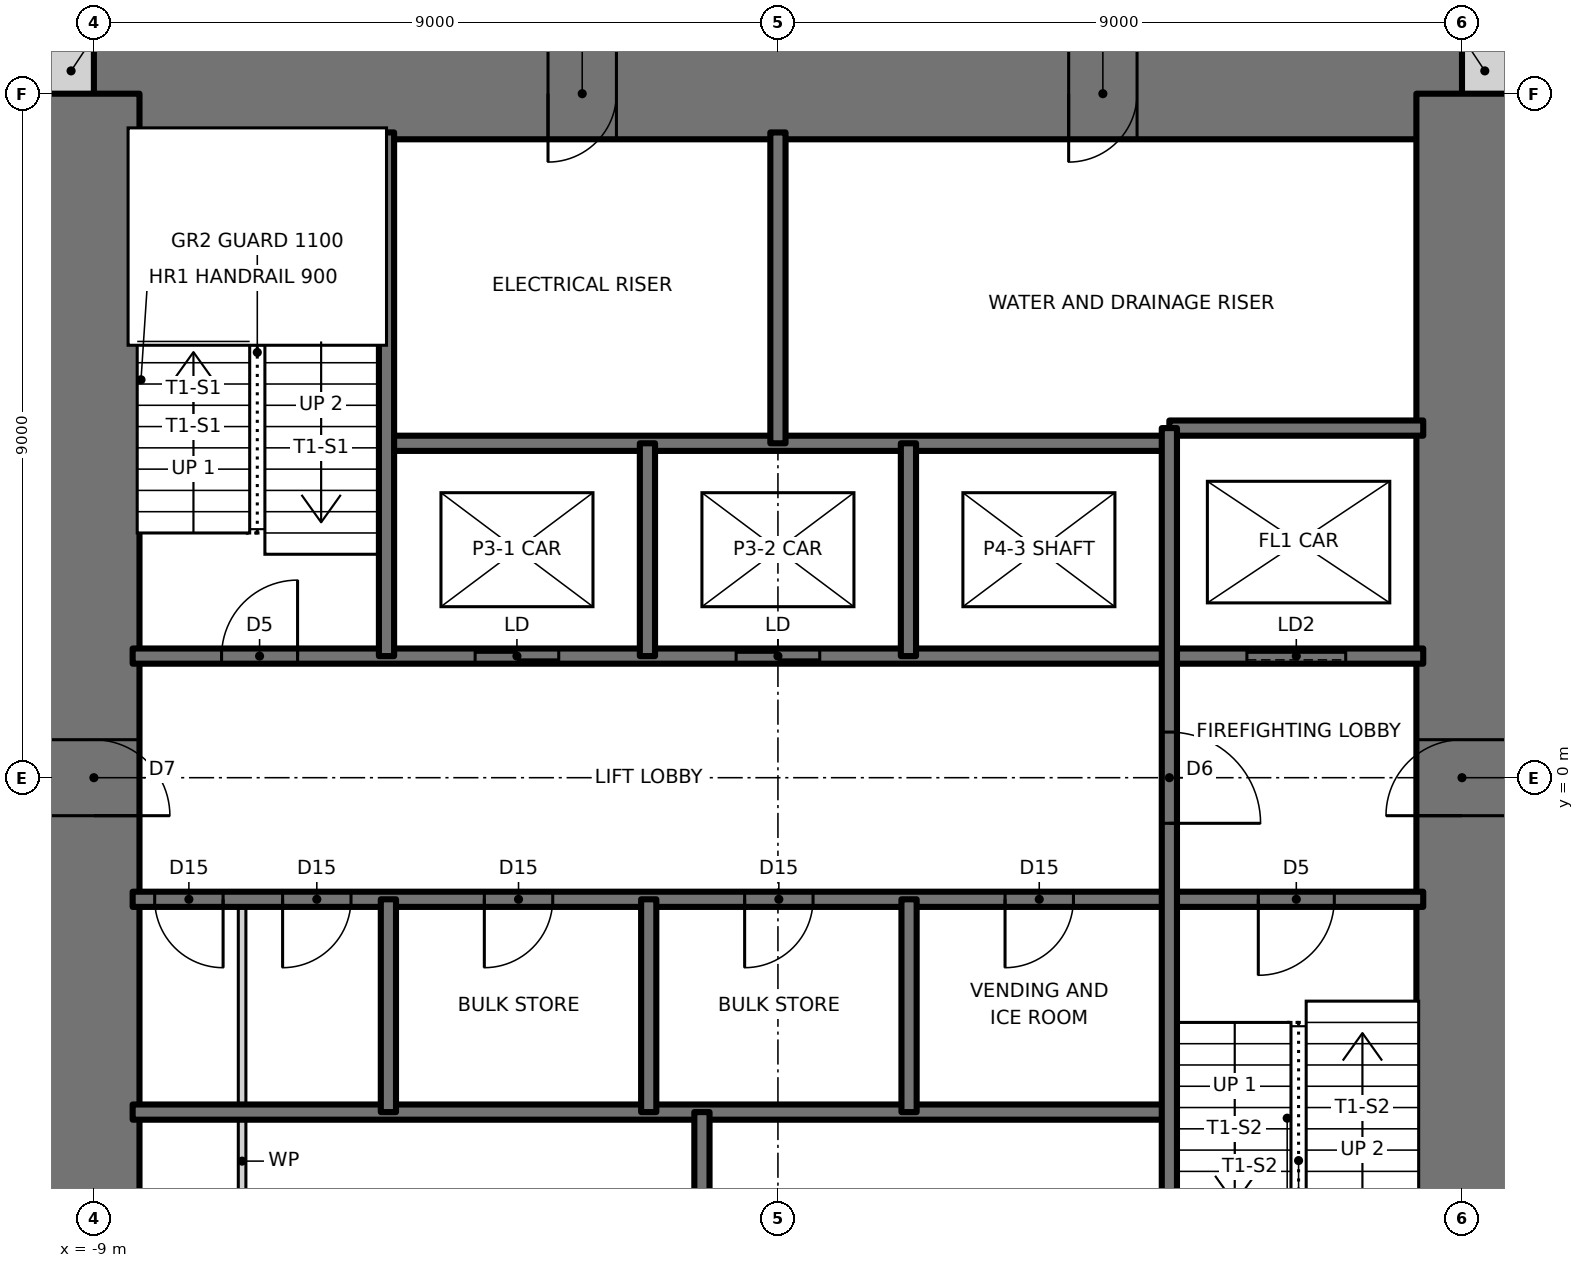
"""IFC4 building model, lengths in metres.
Left out: names, types, materials, properties, quantities, classifications, styles, units other than length and angle.
Written with IfcOpenShell. Run it as: python <this file> out.ifc"""

import sys

from ifc_helpers import new_model, si_unit, direction, frame, frame_2d, origin, place, context, subcontext, project, spatial, rectangle, extrude, element, fill, save


model = new_model("IFC4")
c1 = context("Model", 3, precision=1e-05, world=origin(), true_north=direction((0.0, 1.0)))
c2 = subcontext(c1, "Body", "Model", "MODEL_VIEW")
j1 = project(units=[si_unit("LENGTHUNIT", "METRE"), si_unit("PLANEANGLEUNIT", "RADIAN")], contexts=[c1])
p1 = place(None, origin())
s1 = spatial("IfcSite", under=j1, at=p1, CompositionType="ELEMENT")
p2 = place(p1, origin())
s2 = spatial("IfcBuilding", under=s1, at=p2, CompositionType="ELEMENT")
p3 = place(p2, frame((0.0, 0.0, 195.0)))
s3 = spatial("IfcBuildingStorey", under=s2, at=p3, CompositionType="ELEMENT", Elevation=195.0)
for number, where, z_axis, x_axis in (
    (1, (9.0, 9.3, 0.0), (0.0, 0.0, 1.0), (1.0, 0.0, 0.0)),
    (2, (-9.6, 9.3, 0.0), (0.0, 0.0, 1.0), (1.0, 0.0, 0.0)),
):
    element("IfcWall", number, at=place(p3, frame(where, z_axis=z_axis, x_axis=x_axis)), inside=s3, PredefinedType="SOLIDWALL", context=c2, shape_type="SweptSolid", body=[
        extrude(rectangle(XDim=0.6, YDim=0.6, at=frame_2d((0.3, 0.0))), origin(), (0.0, 0.0, 1.0), 3.5),
    ])
p4 = place(p3, frame((9.0, 9.0, 0.0), z_axis=(0.0, 0.0, 1.0), x_axis=(-1.0, 0.0, 0.0)))
e3 = element("IfcWall", 3, at=p4, inside=s3, PredefinedType="SHEAR", context=c2, shape_type="SweptSolid", body=[
    extrude(rectangle(XDim=18.0, YDim=1.2, at=frame_2d((9.0, 0.0))), origin(), (0.0, 0.0, 1.0), 3.5),
])
p5 = place(p4, frame((11.125, 0.0, 0.0)))
e4 = element("IfcOpeningElement", 4, at=p5, cuts=e3, PredefinedType="OPENING", context=c2, shape_type="SweptSolid", body=[
    extrude(rectangle(XDim=0.9, YDim=2.1, at=frame_2d((0.45, 1.05))), frame((0.0, 0.61, 0.0), z_axis=(0.0, -1.0, 0.0), x_axis=(1.0, 0.0, 0.0)), (0.0, 0.0, 1.0), 1.22),
])
p6 = place(p4, frame((4.275, 0.0, 0.0)))
e5 = element("IfcOpeningElement", 5, at=p6, cuts=e3, PredefinedType="OPENING", context=c2, shape_type="SweptSolid", body=[
    extrude(rectangle(XDim=0.9, YDim=2.1, at=frame_2d((0.45, 1.05))), frame((0.0, 0.61, 0.0), z_axis=(0.0, -1.0, 0.0), x_axis=(1.0, 0.0, 0.0)), (0.0, 0.0, 1.0), 1.22),
])
p7 = place(p3, frame((9.0, -9.0, 0.0), z_axis=(0.0, 0.0, 1.0), x_axis=(0.0, 1.0, 0.0)))
e6 = element("IfcWall", 6, at=p7, inside=s3, PredefinedType="SHEAR", context=c2, shape_type="SweptSolid", body=[
    extrude(rectangle(XDim=18.0, YDim=1.2, at=frame_2d((9.0, 0.0))), origin(), (0.0, 0.0, 1.0), 3.5),
])
p8 = place(p7, frame((8.5, 0.0, 0.0)))
e7 = element("IfcOpeningElement", 7, at=p8, cuts=e6, PredefinedType="OPENING", context=c2, shape_type="SweptSolid", body=[
    extrude(rectangle(XDim=1.0, YDim=2.1, at=frame_2d((0.5, 1.05))), frame((0.0, 0.61, 0.0), z_axis=(0.0, -1.0, 0.0), x_axis=(1.0, 0.0, 0.0)), (0.0, 0.0, 1.0), 1.22),
])
p9 = place(p3, frame((-9.0, 9.0, 0.0), z_axis=(0.0, 0.0, 1.0), x_axis=(0.0, -1.0, 0.0)))
e8 = element("IfcWall", 8, at=p9, inside=s3, PredefinedType="SHEAR", context=c2, shape_type="SweptSolid", body=[
    extrude(rectangle(XDim=18.0, YDim=1.2, at=frame_2d((9.0, 0.0))), origin(), (0.0, 0.0, 1.0), 3.5),
])
p10 = place(p9, frame((8.5, 0.0, 0.0)))
e9 = element("IfcOpeningElement", 9, at=p10, cuts=e8, PredefinedType="OPENING", context=c2, shape_type="SweptSolid", body=[
    extrude(rectangle(XDim=1.0, YDim=2.1, at=frame_2d((0.5, 1.05))), frame((0.0, 0.61, 0.0), z_axis=(0.0, -1.0, 0.0), x_axis=(1.0, 0.0, 0.0)), (0.0, 0.0, 1.0), 1.22),
])
p11 = place(p3, frame((-8.49, -4.4, 0.0), z_axis=(0.0, 0.0, 1.0), x_axis=(1.0, 0.0, 0.0)))
e10 = element("IfcWall", 10, at=p11, inside=s3, PredefinedType="SOLIDWALL", context=c2, shape_type="SweptSolid", body=[
    extrude(rectangle(XDim=13.64, YDim=0.2, at=frame_2d((6.82, 0.0))), origin(), (0.0, 0.0, 1.0), 3.5),
])
p12 = place(p3, frame((-8.49, -1.6, 0.0), z_axis=(0.0, 0.0, 1.0), x_axis=(1.0, 0.0, 0.0)))
e11 = element("IfcWall", 11, at=p12, inside=s3, PredefinedType="SOLIDWALL", context=c2, shape_type="SweptSolid", body=[
    extrude(rectangle(XDim=16.98, YDim=0.2, at=frame_2d((8.49, 0.0))), origin(), (0.0, 0.0, 1.0), 3.5),
])
p13 = place(p12, frame((14.81, 0.0, 0.0)))
e12 = element("IfcOpeningElement", 12, at=p13, cuts=e11, PredefinedType="OPENING", context=c2, shape_type="SweptSolid", body=[
    extrude(rectangle(XDim=1.0, YDim=2.1, at=frame_2d((0.5, 1.05))), frame((0.0, 0.11, 0.0), z_axis=(0.0, -1.0, 0.0), x_axis=(1.0, 0.0, 0.0)), (0.0, 0.0, 1.0), 0.22),
])
p14 = place(p12, frame((1.973, 0.0, 0.0)))
e13 = element("IfcOpeningElement", 13, at=p14, cuts=e11, PredefinedType="OPENING", context=c2, shape_type="SweptSolid", body=[
    extrude(rectangle(XDim=0.9, YDim=2.1, at=frame_2d((0.45, 1.05))), frame((0.0, 0.11, 0.0), z_axis=(0.0, -1.0, 0.0), x_axis=(1.0, 0.0, 0.0)), (0.0, 0.0, 1.0), 0.22),
])
p15 = place(p12, frame((0.29, 0.0, 0.0)))
e14 = element("IfcOpeningElement", 14, at=p15, cuts=e11, PredefinedType="OPENING", context=c2, shape_type="SweptSolid", body=[
    extrude(rectangle(XDim=0.9, YDim=2.1, at=frame_2d((0.45, 1.05))), frame((0.0, 0.11, 0.0), z_axis=(0.0, -1.0, 0.0), x_axis=(1.0, 0.0, 0.0)), (0.0, 0.0, 1.0), 0.22),
])
p16 = place(p12, frame((4.627, 0.0, 0.0)))
e15 = element("IfcOpeningElement", 15, at=p16, cuts=e11, PredefinedType="OPENING", context=c2, shape_type="SweptSolid", body=[
    extrude(rectangle(XDim=0.9, YDim=2.1, at=frame_2d((0.45, 1.05))), frame((0.0, 0.11, 0.0), z_axis=(0.0, -1.0, 0.0), x_axis=(1.0, 0.0, 0.0)), (0.0, 0.0, 1.0), 0.22),
])
p17 = place(p12, frame((8.052, 0.0, 0.0)))
e16 = element("IfcOpeningElement", 16, at=p17, cuts=e11, PredefinedType="OPENING", context=c2, shape_type="SweptSolid", body=[
    extrude(rectangle(XDim=0.9, YDim=2.1, at=frame_2d((0.45, 1.05))), frame((0.0, 0.11, 0.0), z_axis=(0.0, -1.0, 0.0), x_axis=(1.0, 0.0, 0.0)), (0.0, 0.0, 1.0), 0.22),
])
p18 = place(p12, frame((11.478, 0.0, 0.0)))
e17 = element("IfcOpeningElement", 17, at=p18, cuts=e11, PredefinedType="OPENING", context=c2, shape_type="SweptSolid", body=[
    extrude(rectangle(XDim=0.9, YDim=2.1, at=frame_2d((0.45, 1.05))), frame((0.0, 0.11, 0.0), z_axis=(0.0, -1.0, 0.0), x_axis=(1.0, 0.0, 0.0)), (0.0, 0.0, 1.0), 0.22),
])
p19 = place(p3, frame((-8.49, 1.6, 0.0), z_axis=(0.0, 0.0, 1.0), x_axis=(1.0, 0.0, 0.0)))
e18 = element("IfcWall", 18, at=p19, inside=s3, PredefinedType="SOLIDWALL", context=c2, shape_type="SweptSolid", body=[
    extrude(rectangle(XDim=16.98, YDim=0.2, at=frame_2d((8.49, 0.0))), origin(), (0.0, 0.0, 1.0), 3.5),
])
p20 = place(p19, frame((1.17, 0.0, 0.0)))
e19 = element("IfcOpeningElement", 19, at=p20, cuts=e18, PredefinedType="OPENING", context=c2, shape_type="SweptSolid", body=[
    extrude(rectangle(XDim=1.0, YDim=2.1, at=frame_2d((0.5, 1.05))), frame((0.0, 0.11, 0.0), z_axis=(0.0, -1.0, 0.0), x_axis=(1.0, 0.0, 0.0)), (0.0, 0.0, 1.0), 0.22),
])
p21 = place(p19, frame((4.506, 0.0, 0.0)))
e20 = element("IfcOpeningElement", 20, at=p21, cuts=e18, PredefinedType="OPENING", context=c2, shape_type="SweptSolid", body=[
    extrude(rectangle(XDim=1.1, YDim=2.1, at=frame_2d((0.55, 1.05))), frame((0.0, 0.11, 0.0), z_axis=(0.0, -1.0, 0.0), x_axis=(1.0, 0.0, 0.0)), (0.0, 0.0, 1.0), 0.22),
])
p22 = place(p19, frame((7.94, 0.0, 0.0)))
e21 = element("IfcOpeningElement", 21, at=p22, cuts=e18, PredefinedType="OPENING", context=c2, shape_type="SweptSolid", body=[
    extrude(rectangle(XDim=1.1, YDim=2.1, at=frame_2d((0.55, 1.05))), frame((0.0, 0.11, 0.0), z_axis=(0.0, -1.0, 0.0), x_axis=(1.0, 0.0, 0.0)), (0.0, 0.0, 1.0), 0.22),
])
p23 = place(p19, frame((14.66, 0.0, 0.0)))
e22 = element("IfcOpeningElement", 22, at=p23, cuts=e18, PredefinedType="OPENING", context=c2, shape_type="SweptSolid", body=[
    extrude(rectangle(XDim=1.3, YDim=2.1, at=frame_2d((0.65, 1.05))), frame((0.0, 0.11, 0.0), z_axis=(0.0, -1.0, 0.0), x_axis=(1.0, 0.0, 0.0)), (0.0, 0.0, 1.0), 0.22),
])
p24 = place(p3, frame((-5.15, 4.4, 0.0), z_axis=(0.0, 0.0, 1.0), x_axis=(1.0, 0.0, 0.0)))
e23 = element("IfcWall", 23, at=p24, inside=s3, PredefinedType="SOLIDWALL", context=c2, shape_type="SweptSolid", body=[
    extrude(rectangle(XDim=10.3, YDim=0.2, at=frame_2d((5.15, 0.0))), origin(), (0.0, 0.0, 1.0), 3.5),
])
p25 = place(p3, frame((5.15, 4.6, 0.0), z_axis=(0.0, 0.0, 1.0), x_axis=(1.0, 0.0, 0.0)))
e24 = element("IfcWall", 24, at=p25, inside=s3, PredefinedType="SOLIDWALL", context=c2, shape_type="SweptSolid", body=[
    extrude(rectangle(XDim=3.34, YDim=0.2, at=frame_2d((1.67, 0.0))), origin(), (0.0, 0.0, 1.0), 3.5),
])
p26 = place(p3, frame((5.15, -8.49, 0.0), z_axis=(0.0, 0.0, 1.0), x_axis=(0.0, 1.0, 0.0)))
e25 = element("IfcWall", 25, at=p26, inside=s3, PredefinedType="SOLIDWALL", context=c2, shape_type="SweptSolid", body=[
    extrude(rectangle(XDim=13.09, YDim=0.2, at=frame_2d((6.545, 0.0))), origin(), (0.0, 0.0, 1.0), 3.5),
])
p27 = place(p26, frame((7.89, 0.0, 0.0)))
e26 = element("IfcOpeningElement", 26, at=p27, cuts=e25, PredefinedType="OPENING", context=c2, shape_type="SweptSolid", body=[
    extrude(rectangle(XDim=1.2, YDim=2.1, at=frame_2d((0.6, 1.05))), frame((0.0, 0.11, 0.0), z_axis=(0.0, -1.0, 0.0), x_axis=(1.0, 0.0, 0.0)), (0.0, 0.0, 1.0), 0.22),
])
for number, where, z_axis, x_axis in (
    (27, (1.725, -4.4, 0.0), (0.0, 0.0, 1.0), (0.0, 1.0, 0.0)),
    (28, (1.717, 1.6, 0.0), (0.0, 0.0, 1.0), (0.0, 1.0, 0.0)),
):
    element("IfcWall", number, at=place(p3, frame(where, z_axis=z_axis, x_axis=x_axis)), inside=s3, PredefinedType="SOLIDWALL", context=c2, shape_type="SweptSolid", body=[
        extrude(rectangle(XDim=2.8, YDim=0.2, at=frame_2d((1.4, 0.0))), origin(), (0.0, 0.0, 1.0), 3.5),
    ])
for number, where, z_axis, x_axis in (
    (29, (0.0, 4.4, 0.0), (0.0, 0.0, 1.0), (0.0, 1.0, 0.0)),
    (30, (-1.0, -8.49, 0.0), (0.0, 0.0, 1.0), (0.0, 1.0, 0.0)),
):
    element("IfcWall", number, at=place(p3, frame(where, z_axis=z_axis, x_axis=x_axis)), inside=s3, PredefinedType="SOLIDWALL", context=c2, shape_type="SweptSolid", body=[
        extrude(rectangle(XDim=4.09, YDim=0.2, at=frame_2d((2.045, 0.0))), origin(), (0.0, 0.0, 1.0), 3.5),
    ])
for number, where, z_axis, x_axis in (
    (31, (-1.7, -4.4, 0.0), (0.0, 0.0, 1.0), (0.0, 1.0, 0.0)),
    (32, (-1.717, 1.6, 0.0), (0.0, 0.0, 1.0), (0.0, 1.0, 0.0)),
    (33, (-5.125, -4.4, 0.0), (0.0, 0.0, 1.0), (0.0, 1.0, 0.0)),
):
    element("IfcWall", number, at=place(p3, frame(where, z_axis=z_axis, x_axis=x_axis)), inside=s3, PredefinedType="SOLIDWALL", context=c2, shape_type="SweptSolid", body=[
        extrude(rectangle(XDim=2.8, YDim=0.2, at=frame_2d((1.4, 0.0))), origin(), (0.0, 0.0, 1.0), 3.5),
    ])
p28 = place(p3, frame((-5.15, 1.6, 0.0), z_axis=(0.0, 0.0, 1.0), x_axis=(0.0, 1.0, 0.0)))
e34 = element("IfcWall", 34, at=p28, inside=s3, PredefinedType="SOLIDWALL", context=c2, shape_type="SweptSolid", body=[
    extrude(rectangle(XDim=6.89, YDim=0.2, at=frame_2d((3.445, 0.0))), origin(), (0.0, 0.0, 1.0), 3.5),
])
p29 = place(p3, frame((-7.05, -8.49, 0.0), z_axis=(0.0, 0.0, 1.0), x_axis=(0.0, 1.0, 0.0)))
e35 = element("IfcWall", 35, at=p29, inside=s3, PredefinedType="PARTITIONING", context=c2, shape_type="SweptSolid", body=[
    extrude(rectangle(XDim=6.89, YDim=0.1, at=frame_2d((3.445, 0.0))), origin(), (0.0, 0.0, 1.0), 3.3),
])
p30 = place(p29, frame((1.595, 0.0, 0.0)))
e36 = element("IfcOpeningElement", 36, at=p30, cuts=e35, PredefinedType="OPENING", context=c2, shape_type="SweptSolid", body=[
    extrude(rectangle(XDim=0.9, YDim=2.1, at=frame_2d((0.45, 1.05))), frame((0.0, 0.06, 0.0), z_axis=(0.0, -1.0, 0.0), x_axis=(1.0, 0.0, 0.0)), (0.0, 0.0, 1.0), 0.12),
])
p31 = place(p20, origin())
e37 = element("IfcDoor", 37, at=p31, inside=s3, OperationType="SINGLE_SWING_RIGHT", PredefinedType="DOOR", context=c2, shape_type="SweptSolid", body=[
    extrude(rectangle(XDim=1.0, YDim=2.1, at=frame_2d((0.5, 1.05))), frame((0.0, 0.025, 0.0), z_axis=(0.0, -1.0, 0.0), x_axis=(1.0, 0.0, 0.0)), (0.0, 0.0, 1.0), 0.05),
])
fill(e19, e37)
p32 = place(p13, frame((1.0, 0.0, 0.0), z_axis=(0.0, 0.0, 1.0), x_axis=(-1.0, 0.0, 0.0)))
e38 = element("IfcDoor", 38, at=p32, inside=s3, OperationType="SINGLE_SWING_RIGHT", PredefinedType="DOOR", context=c2, shape_type="SweptSolid", body=[
    extrude(rectangle(XDim=1.0, YDim=2.1, at=frame_2d((0.5, 1.05))), frame((0.0, 0.025, 0.0), z_axis=(0.0, -1.0, 0.0), x_axis=(1.0, 0.0, 0.0)), (0.0, 0.0, 1.0), 0.05),
])
fill(e12, e38)
p33 = place(p27, frame((1.2, 0.0, 0.0), z_axis=(0.0, 0.0, 1.0), x_axis=(-1.0, 0.0, 0.0)))
e39 = element("IfcDoor", 39, at=p33, inside=s3, OperationType="SINGLE_SWING_RIGHT", PredefinedType="DOOR", context=c2, shape_type="SweptSolid", body=[
    extrude(rectangle(XDim=1.2, YDim=2.1, at=frame_2d((0.6, 1.05))), frame((0.0, 0.025, 0.0), z_axis=(0.0, -1.0, 0.0), x_axis=(1.0, 0.0, 0.0)), (0.0, 0.0, 1.0), 0.05),
])
fill(e26, e39)
p34 = place(p14, frame((0.9, 0.0, 0.0), z_axis=(0.0, 0.0, 1.0), x_axis=(-1.0, 0.0, 0.0)))
e40 = element("IfcDoor", 40, at=p34, inside=s3, OperationType="SINGLE_SWING_RIGHT", PredefinedType="DOOR", context=c2, shape_type="SweptSolid", body=[
    extrude(rectangle(XDim=0.9, YDim=2.1, at=frame_2d((0.45, 1.05))), frame((0.0, 0.025, 0.0), z_axis=(0.0, -1.0, 0.0), x_axis=(1.0, 0.0, 0.0)), (0.0, 0.0, 1.0), 0.05),
])
fill(e13, e40)
p35 = place(p15, frame((0.9, 0.0, 0.0), z_axis=(0.0, 0.0, 1.0), x_axis=(-1.0, 0.0, 0.0)))
e41 = element("IfcDoor", 41, at=p35, inside=s3, OperationType="SINGLE_SWING_LEFT", PredefinedType="DOOR", context=c2, shape_type="SweptSolid", body=[
    extrude(rectangle(XDim=0.9, YDim=2.1, at=frame_2d((0.45, 1.05))), frame((0.0, 0.025, 0.0), z_axis=(0.0, -1.0, 0.0), x_axis=(1.0, 0.0, 0.0)), (0.0, 0.0, 1.0), 0.05),
])
fill(e14, e41)
p36 = place(p16, frame((0.9, 0.0, 0.0), z_axis=(0.0, 0.0, 1.0), x_axis=(-1.0, 0.0, 0.0)))
e42 = element("IfcDoor", 42, at=p36, inside=s3, OperationType="SINGLE_SWING_RIGHT", PredefinedType="DOOR", context=c2, shape_type="SweptSolid", body=[
    extrude(rectangle(XDim=0.9, YDim=2.1, at=frame_2d((0.45, 1.05))), frame((0.0, 0.025, 0.0), z_axis=(0.0, -1.0, 0.0), x_axis=(1.0, 0.0, 0.0)), (0.0, 0.0, 1.0), 0.05),
])
fill(e15, e42)
p37 = place(p17, frame((0.9, 0.0, 0.0), z_axis=(0.0, 0.0, 1.0), x_axis=(-1.0, 0.0, 0.0)))
e43 = element("IfcDoor", 43, at=p37, inside=s3, OperationType="SINGLE_SWING_RIGHT", PredefinedType="DOOR", context=c2, shape_type="SweptSolid", body=[
    extrude(rectangle(XDim=0.9, YDim=2.1, at=frame_2d((0.45, 1.05))), frame((0.0, 0.025, 0.0), z_axis=(0.0, -1.0, 0.0), x_axis=(1.0, 0.0, 0.0)), (0.0, 0.0, 1.0), 0.05),
])
fill(e16, e43)
p38 = place(p18, frame((0.9, 0.0, 0.0), z_axis=(0.0, 0.0, 1.0), x_axis=(-1.0, 0.0, 0.0)))
e44 = element("IfcDoor", 44, at=p38, inside=s3, OperationType="SINGLE_SWING_RIGHT", PredefinedType="DOOR", context=c2, shape_type="SweptSolid", body=[
    extrude(rectangle(XDim=0.9, YDim=2.1, at=frame_2d((0.45, 1.05))), frame((0.0, 0.025, 0.0), z_axis=(0.0, -1.0, 0.0), x_axis=(1.0, 0.0, 0.0)), (0.0, 0.0, 1.0), 0.05),
])
fill(e17, e44)
p39 = place(p10, origin())
e45 = element("IfcDoor", 45, at=p39, inside=s3, OperationType="SINGLE_SWING_RIGHT", PredefinedType="DOOR", context=c2, shape_type="SweptSolid", body=[
    extrude(rectangle(XDim=1.0, YDim=2.1, at=frame_2d((0.5, 1.05))), frame((0.0, 0.025, 0.0), z_axis=(0.0, -1.0, 0.0), x_axis=(1.0, 0.0, 0.0)), (0.0, 0.0, 1.0), 0.05),
])
fill(e9, e45)
p40 = place(p8, origin())
e46 = element("IfcDoor", 46, at=p40, inside=s3, OperationType="SINGLE_SWING_LEFT", PredefinedType="DOOR", context=c2, shape_type="SweptSolid", body=[
    extrude(rectangle(XDim=1.0, YDim=2.1, at=frame_2d((0.5, 1.05))), frame((0.0, 0.025, 0.0), z_axis=(0.0, -1.0, 0.0), x_axis=(1.0, 0.0, 0.0)), (0.0, 0.0, 1.0), 0.05),
])
fill(e7, e46)
p41 = place(p5, origin())
e47 = element("IfcDoor", 47, at=p41, inside=s3, OperationType="SINGLE_SWING_RIGHT", PredefinedType="DOOR", context=c2, shape_type="SweptSolid", body=[
    extrude(rectangle(XDim=0.9, YDim=2.1, at=frame_2d((0.45, 1.05))), frame((0.0, 0.025, 0.0), z_axis=(0.0, -1.0, 0.0), x_axis=(1.0, 0.0, 0.0)), (0.0, 0.0, 1.0), 0.05),
])
fill(e4, e47)
p42 = place(p6, origin())
e48 = element("IfcDoor", 48, at=p42, inside=s3, OperationType="SINGLE_SWING_RIGHT", PredefinedType="DOOR", context=c2, shape_type="SweptSolid", body=[
    extrude(rectangle(XDim=0.9, YDim=2.1, at=frame_2d((0.45, 1.05))), frame((0.0, 0.025, 0.0), z_axis=(0.0, -1.0, 0.0), x_axis=(1.0, 0.0, 0.0)), (0.0, 0.0, 1.0), 0.05),
])
fill(e5, e48)
p43 = place(p21, origin())
e49 = element("IfcDoor", 49, at=p43, inside=s3, OperationType="DOUBLE_DOOR_SLIDING", PredefinedType="DOOR", context=c2, shape_type="SweptSolid", body=[
    extrude(rectangle(XDim=1.1, YDim=2.1, at=frame_2d((0.55, 1.05))), frame((0.0, 0.025, 0.0), z_axis=(0.0, -1.0, 0.0), x_axis=(1.0, 0.0, 0.0)), (0.0, 0.0, 1.0), 0.05),
])
fill(e20, e49)
p44 = place(p22, origin())
e50 = element("IfcDoor", 50, at=p44, inside=s3, OperationType="DOUBLE_DOOR_SLIDING", PredefinedType="DOOR", context=c2, shape_type="SweptSolid", body=[
    extrude(rectangle(XDim=1.1, YDim=2.1, at=frame_2d((0.55, 1.05))), frame((0.0, 0.025, 0.0), z_axis=(0.0, -1.0, 0.0), x_axis=(1.0, 0.0, 0.0)), (0.0, 0.0, 1.0), 0.05),
])
fill(e21, e50)
p45 = place(p23, origin())
e51 = element("IfcDoor", 51, at=p45, inside=s3, OperationType="SLIDING_TO_LEFT", PredefinedType="DOOR", context=c2, shape_type="SweptSolid", body=[
    extrude(rectangle(XDim=1.3, YDim=2.1, at=frame_2d((0.65, 1.05))), frame((0.0, 0.025, 0.0), z_axis=(0.0, -1.0, 0.0), x_axis=(1.0, 0.0, 0.0)), (0.0, 0.0, 1.0), 0.05),
])
fill(e22, e51)
save(model, sys.argv[1])
